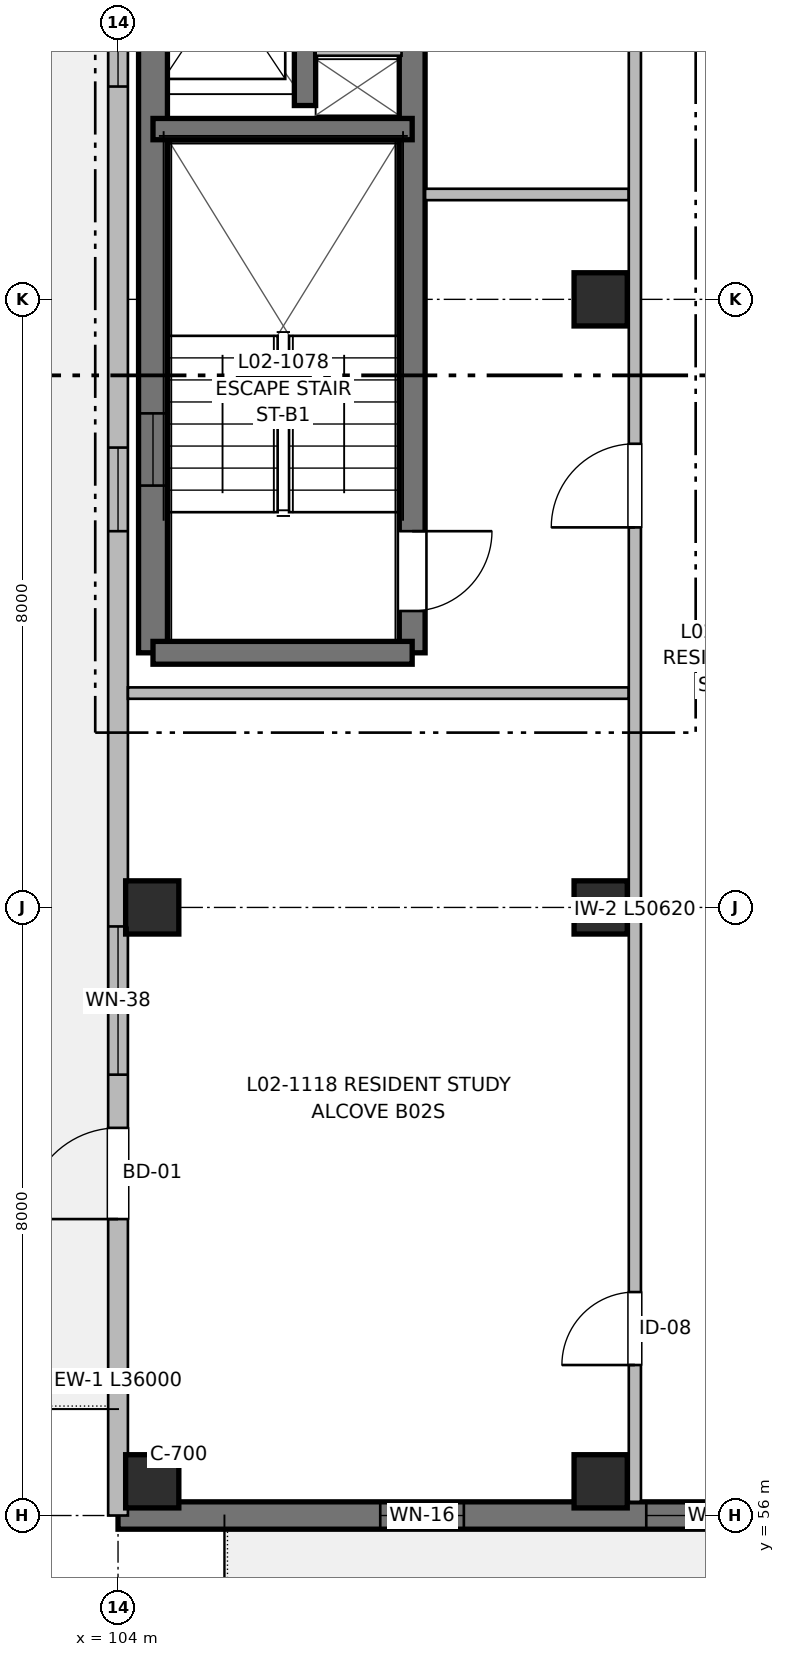
"""IFC4 building model, lengths in metres.
Left out: names, types, materials, properties, quantities, classifications, styles, units other than length and angle.
Written with IfcOpenShell. Run it as: python <this file> out.ifc"""

import sys

from ifc_helpers import new_model, si_unit, direction, frame, frame_2d, origin, origin_2d, place, context, subcontext, project, spatial, rectangle, extrude, element, fill, save


model = new_model("IFC4")
c1 = context("Model", 3, precision=1e-05, world=origin(), true_north=direction((0.0, 1.0)))
c2 = subcontext(c1, "Body", "Model", "MODEL_VIEW")
j1 = project(units=[si_unit("LENGTHUNIT", "METRE"), si_unit("PLANEANGLEUNIT", "RADIAN")], contexts=[c1])
p1 = place(None, origin())
s1 = spatial("IfcSite", under=j1, at=p1, CompositionType="ELEMENT")
p2 = place(p1, origin())
s2 = spatial("IfcBuilding", under=s1, at=p2, CompositionType="ELEMENT")
p3 = place(p2, frame((0.0, 0.0, 7.36)))
s3 = spatial("IfcBuildingStorey", under=s2, at=p3, CompositionType="ELEMENT", Elevation=7.36)
for number, where, z_axis, x_axis in (
    (1, (104.45, 56.45, 0.0), (0.0, 0.0, 1.0), (1.0, 0.0, 0.0)),
    (2, (104.45, 64.0, 0.0), (0.0, 0.0, 1.0), (1.0, 0.0, 0.0)),
    (3, (110.35, 56.45, 0.0), (0.0, 0.0, 1.0), (1.0, 0.0, 0.0)),
    (4, (110.35, 64.0, 0.0), (0.0, 0.0, 1.0), (1.0, 0.0, 0.0)),
    (5, (110.35, 72.0, 0.0), (0.0, 0.0, 1.0), (1.0, 0.0, 0.0)),
):
    element("IfcColumn", number, at=place(p3, frame(where, z_axis=z_axis, x_axis=x_axis)), inside=s3, PredefinedType="COLUMN", context=c2, shape_type="SweptSolid", body=[
        extrude(rectangle(XDim=0.7, YDim=0.7, at=origin_2d()), origin(), (0.0, 0.0, 1.0), 3.2),
    ])
p4 = place(p3, frame((104.46, 67.35, 0.0), z_axis=(0.0, 0.0, 1.0), x_axis=(0.0, 1.0, 0.0)))
e6 = element("IfcWall", 6, at=p4, inside=s3, PredefinedType="SHEAR", context=c2, shape_type="SweptSolid", body=[
    extrude(rectangle(XDim=12.45, YDim=0.38, at=frame_2d((6.225, 0.0))), origin(), (0.0, 0.0, 1.0), 3.2),
])
p5 = place(p4, frame((2.2, 0.0, 0.97)))
e7 = element("IfcOpeningElement", 7, at=p5, cuts=e6, PredefinedType="OPENING", context=c2, shape_type="SweptSolid", body=[
    extrude(rectangle(XDim=0.95, YDim=1.25, at=frame_2d((0.475, 0.625))), frame((0.0, 0.2, 0.0), z_axis=(0.0, -1.0, 0.0), x_axis=(1.0, 0.0, 0.0)), (0.0, 0.0, 1.0), 0.4),
])
p6 = place(p3, frame((107.87, 79.8, 0.0), z_axis=(0.0, 0.0, 1.0), x_axis=(0.0, -1.0, 0.0)))
e8 = element("IfcWall", 8, at=p6, inside=s3, PredefinedType="SHEAR", context=c2, shape_type="SweptSolid", body=[
    extrude(rectangle(XDim=12.45, YDim=0.34, at=frame_2d((6.225, 0.0))), origin(), (0.0, 0.0, 1.0), 3.2),
])
p7 = place(p6, frame((10.85, 0.0, 0.0)))
e9 = element("IfcOpeningElement", 9, at=p7, cuts=e8, PredefinedType="OPENING", context=c2, shape_type="SweptSolid", body=[
    extrude(rectangle(XDim=1.05, YDim=2.15, at=frame_2d((0.525, 1.075))), frame((0.0, 0.18, 0.0), z_axis=(0.0, -1.0, 0.0), x_axis=(1.0, 0.0, 0.0)), (0.0, 0.0, 1.0), 0.36),
])
p8 = place(p3, frame((107.87, 67.35, 0.0), z_axis=(0.0, 0.0, 1.0), x_axis=(-1.0, 0.0, 0.0)))
e10 = element("IfcWall", 10, at=p8, inside=s3, PredefinedType="SHEAR", context=c2, shape_type="SweptSolid", body=[
    extrude(rectangle(XDim=3.41, YDim=0.3, at=frame_2d((1.705, 0.0))), origin(), (0.0, 0.0, 1.0), 3.2),
])
p9 = place(p3, frame((104.46, 74.24, 0.0), z_axis=(0.0, 0.0, 1.0), x_axis=(1.0, 0.0, 0.0)))
e11 = element("IfcWall", 11, at=p9, inside=s3, PredefinedType="SHEAR", context=c2, shape_type="SweptSolid", body=[
    extrude(rectangle(XDim=3.41, YDim=0.28, at=frame_2d((1.705, 0.0))), origin(), (0.0, 0.0, 1.0), 3.2),
])
p10 = place(p3, frame((106.46, 74.55, 0.0), z_axis=(0.0, 0.0, 1.0), x_axis=(0.0, 1.0, 0.0)))
e12 = element("IfcWall", 12, at=p10, inside=s3, PredefinedType="SHEAR", context=c2, shape_type="SweptSolid", body=[
    extrude(rectangle(XDim=5.25, YDim=0.28, at=frame_2d((2.625, 0.0))), origin(), (0.0, 0.0, 1.0), 3.2),
])
p11 = place(p10, frame((1.15, 0.0, 0.0)))
e13 = element("IfcOpeningElement", 13, at=p11, cuts=e12, PredefinedType="OPENING", context=c2, shape_type="SweptSolid", body=[
    extrude(rectangle(XDim=1.0, YDim=2.15, at=frame_2d((0.5, 1.075))), frame((0.0, 0.15, 0.0), z_axis=(0.0, -1.0, 0.0), x_axis=(1.0, 0.0, 0.0)), (0.0, 0.0, 1.0), 0.3),
])
p12 = place(p10, frame((3.85, 0.0, 0.0)))
e14 = element("IfcOpeningElement", 14, at=p12, cuts=e12, PredefinedType="OPENING", context=c2, shape_type="SweptSolid", body=[
    extrude(rectangle(XDim=0.9, YDim=2.15, at=frame_2d((0.45, 1.075))), frame((0.0, 0.15, 0.0), z_axis=(0.0, -1.0, 0.0), x_axis=(1.0, 0.0, 0.0)), (0.0, 0.0, 1.0), 0.3),
])
p13 = place(p3, frame((106.6, 75.28, 0.0), z_axis=(0.0, 0.0, 1.0), x_axis=(1.0, 0.0, 0.0)))
e15 = element("IfcWall", 15, at=p13, inside=s3, PredefinedType="PARTITIONING", context=c2, shape_type="SweptSolid", body=[
    extrude(rectangle(XDim=1.13, YDim=0.15, at=frame_2d((0.565, 0.0))), origin(), (0.0, 0.0, 1.0), 2.95),
])
p14 = place(p3, frame((120.0, 56.0, 0.0), z_axis=(0.0, 0.0, 1.0), x_axis=(-1.0, 0.0, 0.0)))
e16 = element("IfcWall", 16, at=p14, inside=s3, PredefinedType="SHEAR", context=c2, shape_type="SweptSolid", body=[
    extrude(rectangle(XDim=16.0, YDim=0.36, at=frame_2d((8.0, 0.0))), origin(), (0.0, 0.0, 1.0), 2.98),
])
p15 = place(p14, frame((2.55, 0.0, 0.0)))
e17 = element("IfcOpeningElement", 17, at=p15, cuts=e16, PredefinedType="OPENING", context=c2, shape_type="SweptSolid", body=[
    extrude(rectangle(XDim=1.2, YDim=2.2, at=frame_2d((0.6, 1.1))), frame((0.0, 0.19, 0.0), z_axis=(0.0, -1.0, 0.0), x_axis=(1.0, 0.0, 0.0)), (0.0, 0.0, 1.0), 0.38),
])
p16 = place(p14, frame((7.1, 0.0, 0.72)))
e18 = element("IfcOpeningElement", 18, at=p16, cuts=e16, PredefinedType="OPENING", context=c2, shape_type="SweptSolid", body=[
    extrude(rectangle(XDim=1.95, YDim=1.5, at=frame_2d((0.975, 0.75))), frame((0.0, 0.19, 0.0), z_axis=(0.0, -1.0, 0.0), x_axis=(1.0, 0.0, 0.0)), (0.0, 0.0, 1.0), 0.38),
])
p17 = place(p14, frame((11.45, 0.0, 0.62)))
e19 = element("IfcOpeningElement", 19, at=p17, cuts=e16, PredefinedType="OPENING", context=c2, shape_type="SweptSolid", body=[
    extrude(rectangle(XDim=1.1, YDim=1.6, at=frame_2d((0.55, 0.8))), frame((0.0, 0.19, 0.0), z_axis=(0.0, -1.0, 0.0), x_axis=(1.0, 0.0, 0.0)), (0.0, 0.0, 1.0), 0.38),
])
p18 = place(p3, frame((104.0, 56.0, 0.0), z_axis=(0.0, 0.0, 1.0), x_axis=(0.0, 1.0, 0.0)))
e20 = element("IfcWall", 20, at=p18, inside=s3, PredefinedType="SOLIDWALL", context=c2, shape_type="SweptSolid", body=[
    extrude(rectangle(XDim=36.0, YDim=0.26, at=frame_2d((18.0, 0.0))), origin(), (0.0, 0.0, 1.0), 2.98),
])
p19 = place(p18, frame((3.9, 0.0, 0.0)))
e21 = element("IfcOpeningElement", 21, at=p19, cuts=e20, PredefinedType="OPENING", context=c2, shape_type="SweptSolid", body=[
    extrude(rectangle(XDim=1.2, YDim=2.2, at=frame_2d((0.6, 1.1))), frame((0.0, 0.14, 0.0), z_axis=(0.0, -1.0, 0.0), x_axis=(1.0, 0.0, 0.0)), (0.0, 0.0, 1.0), 0.28),
])
p20 = place(p18, frame((5.8, 0.0, 0.72)))
e22 = element("IfcOpeningElement", 22, at=p20, cuts=e20, PredefinedType="OPENING", context=c2, shape_type="SweptSolid", body=[
    extrude(rectangle(XDim=1.95, YDim=1.5, at=frame_2d((0.975, 0.75))), frame((0.0, 0.14, 0.0), z_axis=(0.0, -1.0, 0.0), x_axis=(1.0, 0.0, 0.0)), (0.0, 0.0, 1.0), 0.28),
])
p21 = place(p18, frame((12.95, 0.0, 0.62)))
e23 = element("IfcOpeningElement", 23, at=p21, cuts=e20, PredefinedType="OPENING", context=c2, shape_type="SweptSolid", body=[
    extrude(rectangle(XDim=1.1, YDim=1.6, at=frame_2d((0.55, 0.8))), frame((0.0, 0.14, 0.0), z_axis=(0.0, -1.0, 0.0), x_axis=(1.0, 0.0, 0.0)), (0.0, 0.0, 1.0), 0.28),
])
p22 = place(p18, frame((18.8, 0.0, 0.47)))
e24 = element("IfcOpeningElement", 24, at=p22, cuts=e20, PredefinedType="OPENING", context=c2, shape_type="SweptSolid", body=[
    extrude(rectangle(XDim=2.7, YDim=1.75, at=frame_2d((1.35, 0.875))), frame((0.0, 0.14, 0.0), z_axis=(0.0, -1.0, 0.0), x_axis=(1.0, 0.0, 0.0)), (0.0, 0.0, 1.0), 0.28),
])
p23 = place(p18, frame((30.65, 0.0, 0.72)))
e25 = element("IfcOpeningElement", 25, at=p23, cuts=e20, PredefinedType="OPENING", context=c2, shape_type="SweptSolid", body=[
    extrude(rectangle(XDim=1.7, YDim=1.5, at=frame_2d((0.85, 0.75))), frame((0.0, 0.14, 0.0), z_axis=(0.0, -1.0, 0.0), x_axis=(1.0, 0.0, 0.0)), (0.0, 0.0, 1.0), 0.28),
])
p24 = place(p3, frame((104.13, 66.82, 0.0), z_axis=(0.0, 0.0, 1.0), x_axis=(1.0, 0.0, 0.0)))
e26 = element("IfcWall", 26, at=p24, inside=s3, PredefinedType="PARTITIONING", context=c2, shape_type="SweptSolid", body=[
    extrude(rectangle(XDim=6.59, YDim=0.15, at=frame_2d((3.295, 0.0))), origin(), (0.0, 0.0, 1.0), 2.935),
])
p25 = place(p3, frame((108.04, 73.38, 0.0), z_axis=(0.0, 0.0, 1.0), x_axis=(1.0, 0.0, 0.0)))
e27 = element("IfcWall", 27, at=p25, inside=s3, PredefinedType="PARTITIONING", context=c2, shape_type="SweptSolid", body=[
    extrude(rectangle(XDim=2.68, YDim=0.15, at=frame_2d((1.34, 0.0))), origin(), (0.0, 0.0, 1.0), 2.935),
])
p26 = place(p3, frame((110.8, 56.18, 0.0), z_axis=(0.0, 0.0, 1.0), x_axis=(0.0, 1.0, 0.0)))
e28 = element("IfcWall", 28, at=p26, inside=s3, PredefinedType="PARTITIONING", context=c2, shape_type="SweptSolid", body=[
    extrude(rectangle(XDim=50.62, YDim=0.16, at=frame_2d((25.31, 0.0))), origin(), (0.0, 0.0, 1.0), 2.935),
])
p27 = place(p26, frame((12.82, 0.0, 0.0)))
e29 = element("IfcOpeningElement", 29, at=p27, cuts=e28, PredefinedType="OPENING", context=c2, shape_type="SweptSolid", body=[
    extrude(rectangle(XDim=1.1, YDim=2.15, at=frame_2d((0.55, 1.075))), frame((0.0, 0.09, 0.0), z_axis=(0.0, -1.0, 0.0), x_axis=(1.0, 0.0, 0.0)), (0.0, 0.0, 1.0), 0.18),
])
p28 = place(p26, frame((19.22, 0.0, 0.0)))
e30 = element("IfcOpeningElement", 30, at=p28, cuts=e28, PredefinedType="OPENING", context=c2, shape_type="SweptSolid", body=[
    extrude(rectangle(XDim=1.6, YDim=2.15, at=frame_2d((0.8, 1.075))), frame((0.0, 0.09, 0.0), z_axis=(0.0, -1.0, 0.0), x_axis=(1.0, 0.0, 0.0)), (0.0, 0.0, 1.0), 0.18),
])
p29 = place(p26, frame((1.8, 0.0, 0.0)))
e31 = element("IfcOpeningElement", 31, at=p29, cuts=e28, PredefinedType="OPENING", context=c2, shape_type="SweptSolid", body=[
    extrude(rectangle(XDim=0.96, YDim=2.15, at=frame_2d((0.48, 1.075))), frame((0.0, 0.09, 0.0), z_axis=(0.0, -1.0, 0.0), x_axis=(1.0, 0.0, 0.0)), (0.0, 0.0, 1.0), 0.18),
])
p30 = place(p26, frame((32.625, 0.0, 0.0)))
e32 = element("IfcOpeningElement", 32, at=p30, cuts=e28, PredefinedType="OPENING", context=c2, shape_type="SweptSolid", body=[
    extrude(rectangle(XDim=0.98, YDim=2.15, at=frame_2d((0.49, 1.075))), frame((0.0, 0.09, 0.0), z_axis=(0.0, -1.0, 0.0), x_axis=(1.0, 0.0, 0.0)), (0.0, 0.0, 1.0), 0.18),
])
p31 = place(p26, frame((41.235, 0.0, 0.0)))
e33 = element("IfcOpeningElement", 33, at=p31, cuts=e28, PredefinedType="OPENING", context=c2, shape_type="SweptSolid", body=[
    extrude(rectangle(XDim=0.98, YDim=2.15, at=frame_2d((0.49, 1.075))), frame((0.0, 0.09, 0.0), z_axis=(0.0, -1.0, 0.0), x_axis=(1.0, 0.0, 0.0)), (0.0, 0.0, 1.0), 0.18),
])
p32 = place(p7, origin())
e34 = element("IfcDoor", 34, at=p32, inside=s3, OperationType="SINGLE_SWING_LEFT", PredefinedType="DOOR", context=c2, shape_type="SweptSolid", body=[
    extrude(rectangle(XDim=1.05, YDim=2.15, at=frame_2d((0.525, 1.075))), frame((0.0, 0.025, 0.0), z_axis=(0.0, -1.0, 0.0), x_axis=(1.0, 0.0, 0.0)), (0.0, 0.0, 1.0), 0.05),
])
fill(e9, e34)
p33 = place(p5, origin())
e35 = element("IfcWindow", 35, at=p33, inside=s3, PartitioningType="SINGLE_PANEL", PredefinedType="WINDOW", context=c2, shape_type="SweptSolid", body=[
    extrude(rectangle(XDim=0.95, YDim=1.25, at=frame_2d((0.475, 0.625))), frame((0.0, 0.03, 0.0), z_axis=(0.0, -1.0, 0.0), x_axis=(1.0, 0.0, 0.0)), (0.0, 0.0, 1.0), 0.06),
])
fill(e7, e35)
p34 = place(p16, origin())
e36 = element("IfcWindow", 36, at=p34, inside=s3, PartitioningType="SINGLE_PANEL", PredefinedType="WINDOW", context=c2, shape_type="SweptSolid", body=[
    extrude(rectangle(XDim=1.95, YDim=1.5, at=frame_2d((0.975, 0.75))), frame((0.0, 0.03, 0.0), z_axis=(0.0, -1.0, 0.0), x_axis=(1.0, 0.0, 0.0)), (0.0, 0.0, 1.0), 0.06),
])
fill(e18, e36)
p35 = place(p17, origin())
e37 = element("IfcWindow", 37, at=p35, inside=s3, PartitioningType="SINGLE_PANEL", PredefinedType="WINDOW", context=c2, shape_type="SweptSolid", body=[
    extrude(rectangle(XDim=1.1, YDim=1.6, at=frame_2d((0.55, 0.8))), frame((0.0, 0.03, 0.0), z_axis=(0.0, -1.0, 0.0), x_axis=(1.0, 0.0, 0.0)), (0.0, 0.0, 1.0), 0.06),
])
fill(e19, e37)
p36 = place(p19, origin())
e38 = element("IfcDoor", 38, at=p36, inside=s3, OperationType="SINGLE_SWING_LEFT", PredefinedType="DOOR", context=c2, shape_type="SweptSolid", body=[
    extrude(rectangle(XDim=1.2, YDim=2.2, at=frame_2d((0.6, 1.1))), frame((0.0, 0.025, 0.0), z_axis=(0.0, -1.0, 0.0), x_axis=(1.0, 0.0, 0.0)), (0.0, 0.0, 1.0), 0.05),
])
fill(e21, e38)
p37 = place(p20, origin())
e39 = element("IfcWindow", 39, at=p37, inside=s3, PartitioningType="SINGLE_PANEL", PredefinedType="WINDOW", context=c2, shape_type="SweptSolid", body=[
    extrude(rectangle(XDim=1.95, YDim=1.5, at=frame_2d((0.975, 0.75))), frame((0.0, 0.03, 0.0), z_axis=(0.0, -1.0, 0.0), x_axis=(1.0, 0.0, 0.0)), (0.0, 0.0, 1.0), 0.06),
])
fill(e22, e39)
p38 = place(p21, origin())
e40 = element("IfcWindow", 40, at=p38, inside=s3, PartitioningType="SINGLE_PANEL", PredefinedType="WINDOW", context=c2, shape_type="SweptSolid", body=[
    extrude(rectangle(XDim=1.1, YDim=1.6, at=frame_2d((0.55, 0.8))), frame((0.0, 0.03, 0.0), z_axis=(0.0, -1.0, 0.0), x_axis=(1.0, 0.0, 0.0)), (0.0, 0.0, 1.0), 0.06),
])
fill(e23, e40)
p39 = place(p22, origin())
e41 = element("IfcWindow", 41, at=p39, inside=s3, PartitioningType="SINGLE_PANEL", PredefinedType="WINDOW", context=c2, shape_type="SweptSolid", body=[
    extrude(rectangle(XDim=2.7, YDim=1.75, at=frame_2d((1.35, 0.875))), frame((0.0, 0.03, 0.0), z_axis=(0.0, -1.0, 0.0), x_axis=(1.0, 0.0, 0.0)), (0.0, 0.0, 1.0), 0.06),
])
fill(e24, e41)
p40 = place(p27, origin())
e42 = element("IfcDoor", 42, at=p40, inside=s3, OperationType="SINGLE_SWING_LEFT", PredefinedType="DOOR", context=c2, shape_type="SweptSolid", body=[
    extrude(rectangle(XDim=1.1, YDim=2.15, at=frame_2d((0.55, 1.075))), frame((0.0, 0.025, 0.0), z_axis=(0.0, -1.0, 0.0), x_axis=(1.0, 0.0, 0.0)), (0.0, 0.0, 1.0), 0.05),
])
fill(e29, e42)
p41 = place(p29, origin())
e43 = element("IfcDoor", 43, at=p41, inside=s3, OperationType="SINGLE_SWING_LEFT", PredefinedType="DOOR", context=c2, shape_type="SweptSolid", body=[
    extrude(rectangle(XDim=0.96, YDim=2.15, at=frame_2d((0.48, 1.075))), frame((0.0, 0.025, 0.0), z_axis=(0.0, -1.0, 0.0), x_axis=(1.0, 0.0, 0.0)), (0.0, 0.0, 1.0), 0.05),
])
fill(e31, e43)
save(model, sys.argv[1])
